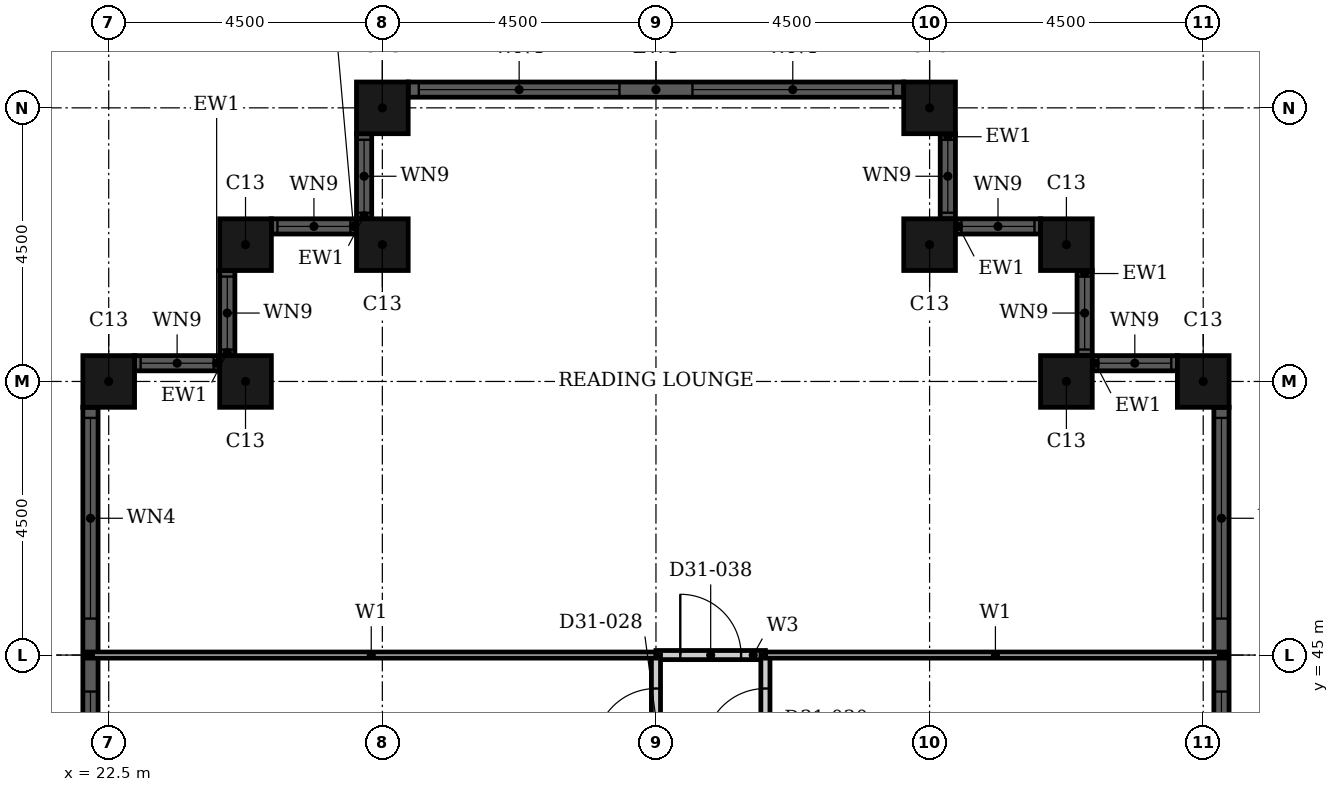
"""IFC4 building model, lengths in metres.
Left out: names, types, materials, properties, quantities, classifications, styles, units other than length and angle.
Written with IfcOpenShell. Run it as: python <this file> out.ifc"""

import sys

from ifc_helpers import new_model, si_unit, direction, frame, frame_2d, origin, origin_2d, place, context, subcontext, project, spatial, rectangle, hollow_rectangle, extrude, element, fill, save


model = new_model("IFC4")
c1 = context("Model", 3, precision=1e-05, world=origin(), true_north=direction((0.0, 1.0)))
c2 = subcontext(c1, "Body", "Model", "MODEL_VIEW")
j1 = project(units=[si_unit("LENGTHUNIT", "METRE"), si_unit("PLANEANGLEUNIT", "RADIAN")], contexts=[c1])
p1 = place(None, origin())
s1 = spatial("IfcSite", under=j1, at=p1, CompositionType="ELEMENT")
p2 = place(p1, origin())
s2 = spatial("IfcBuilding", under=s1, at=p2, CompositionType="ELEMENT")
p3 = place(p2, frame((0.0, 0.0, 126.0)))
s3 = spatial("IfcBuildingStorey", under=s2, at=p3, CompositionType="ELEMENT", Elevation=126.0)
for number, where, z_axis, x_axis in (
    (1, (40.5, 49.5, 0.0), (0.0, 0.0, 1.0), (1.0, 0.0, 0.0)),
    (2, (38.25, 49.5, 0.0), (0.0, 0.0, 1.0), (1.0, 0.0, 0.0)),
    (3, (38.25, 51.75, 0.0), (0.0, 0.0, 1.0), (1.0, 0.0, 0.0)),
    (4, (36.0, 51.75, 0.0), (0.0, 0.0, 1.0), (1.0, 0.0, 0.0)),
    (5, (36.0, 54.0, 0.0), (0.0, 0.0, 1.0), (1.0, 0.0, 0.0)),
    (6, (27.0, 54.0, 0.0), (0.0, 0.0, 1.0), (1.0, 0.0, 0.0)),
    (7, (27.0, 51.75, 0.0), (0.0, 0.0, 1.0), (1.0, 0.0, 0.0)),
    (8, (24.75, 51.75, 0.0), (0.0, 0.0, 1.0), (1.0, 0.0, 0.0)),
    (9, (24.75, 49.5, 0.0), (0.0, 0.0, 1.0), (1.0, 0.0, 0.0)),
    (10, (22.5, 49.5, 0.0), (0.0, 0.0, 1.0), (1.0, 0.0, 0.0)),
):
    element("IfcColumn", number, at=place(p3, frame(where, z_axis=z_axis, x_axis=x_axis)), inside=s3, PredefinedType="COLUMN", context=c2, shape_type="SweptSolid", body=[
        extrude(hollow_rectangle(XDim=0.85, YDim=0.85, WallThickness=0.026, at=origin_2d()), origin(), (0.0, 0.0, 1.0), 3.6),
    ])
p4 = place(p3, frame((40.8, 40.925, 0.0), z_axis=(0.0, 0.0, 1.0), x_axis=(0.0, 1.0, 0.0)))
e11 = element("IfcWall", 11, at=p4, inside=s3, PredefinedType="SOLIDWALL", context=c2, shape_type="SweptSolid", body=[
    extrude(rectangle(XDim=8.15, YDim=0.25, at=frame_2d((4.075, 0.0))), origin(), (0.0, 0.0, 1.0), 3.6),
])
p5 = place(p4, frame((0.175, 0.0, 0.9)))
e12 = element("IfcOpeningElement", 12, at=p5, cuts=e11, PredefinedType="OPENING", context=c2, shape_type="SweptSolid", body=[
    extrude(rectangle(XDim=3.3, YDim=2.08, at=frame_2d((1.65, 1.04))), frame((0.0, 0.135, 0.0), z_axis=(0.0, -1.0, 0.0), x_axis=(1.0, 0.0, 0.0)), (0.0, 0.0, 1.0), 0.27),
])
p6 = place(p4, frame((4.675, 0.0, 0.9)))
e13 = element("IfcOpeningElement", 13, at=p6, cuts=e11, PredefinedType="OPENING", context=c2, shape_type="SweptSolid", body=[
    extrude(rectangle(XDim=3.3, YDim=2.08, at=frame_2d((1.65, 1.04))), frame((0.0, 0.135, 0.0), z_axis=(0.0, -1.0, 0.0), x_axis=(1.0, 0.0, 0.0)), (0.0, 0.0, 1.0), 0.27),
])
p7 = place(p3, frame((40.075, 49.8, 0.0), z_axis=(0.0, 0.0, 1.0), x_axis=(-1.0, 0.0, 0.0)))
e14 = element("IfcWall", 14, at=p7, inside=s3, PredefinedType="SOLIDWALL", context=c2, shape_type="SweptSolid", body=[
    extrude(rectangle(XDim=1.4, YDim=0.25, at=frame_2d((0.7, 0.0))), origin(), (0.0, 0.0, 1.0), 3.6),
])
p8 = place(p7, frame((0.1, 0.0, 0.9)))
e15 = element("IfcOpeningElement", 15, at=p8, cuts=e14, PredefinedType="OPENING", context=c2, shape_type="SweptSolid", body=[
    extrude(rectangle(XDim=1.2, YDim=2.08, at=frame_2d((0.6, 1.04))), frame((0.0, 0.135, 0.0), z_axis=(0.0, -1.0, 0.0), x_axis=(1.0, 0.0, 0.0)), (0.0, 0.0, 1.0), 0.27),
])
p9 = place(p3, frame((38.55, 49.925, 0.0), z_axis=(0.0, 0.0, 1.0), x_axis=(0.0, 1.0, 0.0)))
e16 = element("IfcWall", 16, at=p9, inside=s3, PredefinedType="SOLIDWALL", context=c2, shape_type="SweptSolid", body=[
    extrude(rectangle(XDim=1.4, YDim=0.25, at=frame_2d((0.7, 0.0))), origin(), (0.0, 0.0, 1.0), 3.6),
])
p10 = place(p9, frame((0.1, 0.0, 0.9)))
e17 = element("IfcOpeningElement", 17, at=p10, cuts=e16, PredefinedType="OPENING", context=c2, shape_type="SweptSolid", body=[
    extrude(rectangle(XDim=1.2, YDim=2.08, at=frame_2d((0.6, 1.04))), frame((0.0, 0.135, 0.0), z_axis=(0.0, -1.0, 0.0), x_axis=(1.0, 0.0, 0.0)), (0.0, 0.0, 1.0), 0.27),
])
p11 = place(p3, frame((37.825, 52.05, 0.0), z_axis=(0.0, 0.0, 1.0), x_axis=(-1.0, 0.0, 0.0)))
e18 = element("IfcWall", 18, at=p11, inside=s3, PredefinedType="SOLIDWALL", context=c2, shape_type="SweptSolid", body=[
    extrude(rectangle(XDim=1.4, YDim=0.25, at=frame_2d((0.7, 0.0))), origin(), (0.0, 0.0, 1.0), 3.6),
])
p12 = place(p11, frame((0.1, 0.0, 0.9)))
e19 = element("IfcOpeningElement", 19, at=p12, cuts=e18, PredefinedType="OPENING", context=c2, shape_type="SweptSolid", body=[
    extrude(rectangle(XDim=1.2, YDim=2.08, at=frame_2d((0.6, 1.04))), frame((0.0, 0.135, 0.0), z_axis=(0.0, -1.0, 0.0), x_axis=(1.0, 0.0, 0.0)), (0.0, 0.0, 1.0), 0.27),
])
p13 = place(p3, frame((36.3, 52.175, 0.0), z_axis=(0.0, 0.0, 1.0), x_axis=(0.0, 1.0, 0.0)))
e20 = element("IfcWall", 20, at=p13, inside=s3, PredefinedType="SOLIDWALL", context=c2, shape_type="SweptSolid", body=[
    extrude(rectangle(XDim=1.4, YDim=0.25, at=frame_2d((0.7, 0.0))), origin(), (0.0, 0.0, 1.0), 3.6),
])
p14 = place(p13, frame((0.1, 0.0, 0.9)))
e21 = element("IfcOpeningElement", 21, at=p14, cuts=e20, PredefinedType="OPENING", context=c2, shape_type="SweptSolid", body=[
    extrude(rectangle(XDim=1.2, YDim=2.08, at=frame_2d((0.6, 1.04))), frame((0.0, 0.135, 0.0), z_axis=(0.0, -1.0, 0.0), x_axis=(1.0, 0.0, 0.0)), (0.0, 0.0, 1.0), 0.27),
])
p15 = place(p3, frame((35.575, 54.3, 0.0), z_axis=(0.0, 0.0, 1.0), x_axis=(-1.0, 0.0, 0.0)))
e22 = element("IfcWall", 22, at=p15, inside=s3, PredefinedType="SOLIDWALL", context=c2, shape_type="SweptSolid", body=[
    extrude(rectangle(XDim=8.15, YDim=0.25, at=frame_2d((4.075, 0.0))), origin(), (0.0, 0.0, 1.0), 3.6),
])
p16 = place(p15, frame((0.175, 0.0, 0.9)))
e23 = element("IfcOpeningElement", 23, at=p16, cuts=e22, PredefinedType="OPENING", context=c2, shape_type="SweptSolid", body=[
    extrude(rectangle(XDim=3.3, YDim=2.08, at=frame_2d((1.65, 1.04))), frame((0.0, 0.135, 0.0), z_axis=(0.0, -1.0, 0.0), x_axis=(1.0, 0.0, 0.0)), (0.0, 0.0, 1.0), 0.27),
])
p17 = place(p15, frame((4.675, 0.0, 0.9)))
e24 = element("IfcOpeningElement", 24, at=p17, cuts=e22, PredefinedType="OPENING", context=c2, shape_type="SweptSolid", body=[
    extrude(rectangle(XDim=3.3, YDim=2.08, at=frame_2d((1.65, 1.04))), frame((0.0, 0.135, 0.0), z_axis=(0.0, -1.0, 0.0), x_axis=(1.0, 0.0, 0.0)), (0.0, 0.0, 1.0), 0.27),
])
p18 = place(p3, frame((26.7, 53.575, 0.0), z_axis=(0.0, 0.0, 1.0), x_axis=(0.0, -1.0, 0.0)))
e25 = element("IfcWall", 25, at=p18, inside=s3, PredefinedType="SOLIDWALL", context=c2, shape_type="SweptSolid", body=[
    extrude(rectangle(XDim=1.4, YDim=0.25, at=frame_2d((0.7, 0.0))), origin(), (0.0, 0.0, 1.0), 3.6),
])
p19 = place(p18, frame((0.1, 0.0, 0.9)))
e26 = element("IfcOpeningElement", 26, at=p19, cuts=e25, PredefinedType="OPENING", context=c2, shape_type="SweptSolid", body=[
    extrude(rectangle(XDim=1.2, YDim=2.08, at=frame_2d((0.6, 1.04))), frame((0.0, 0.135, 0.0), z_axis=(0.0, -1.0, 0.0), x_axis=(1.0, 0.0, 0.0)), (0.0, 0.0, 1.0), 0.27),
])
p20 = place(p3, frame((26.575, 52.05, 0.0), z_axis=(0.0, 0.0, 1.0), x_axis=(-1.0, 0.0, 0.0)))
e27 = element("IfcWall", 27, at=p20, inside=s3, PredefinedType="SOLIDWALL", context=c2, shape_type="SweptSolid", body=[
    extrude(rectangle(XDim=1.4, YDim=0.25, at=frame_2d((0.7, 0.0))), origin(), (0.0, 0.0, 1.0), 3.6),
])
p21 = place(p20, frame((0.1, 0.0, 0.9)))
e28 = element("IfcOpeningElement", 28, at=p21, cuts=e27, PredefinedType="OPENING", context=c2, shape_type="SweptSolid", body=[
    extrude(rectangle(XDim=1.2, YDim=2.08, at=frame_2d((0.6, 1.04))), frame((0.0, 0.135, 0.0), z_axis=(0.0, -1.0, 0.0), x_axis=(1.0, 0.0, 0.0)), (0.0, 0.0, 1.0), 0.27),
])
p22 = place(p3, frame((24.45, 51.325, 0.0), z_axis=(0.0, 0.0, 1.0), x_axis=(0.0, -1.0, 0.0)))
e29 = element("IfcWall", 29, at=p22, inside=s3, PredefinedType="SOLIDWALL", context=c2, shape_type="SweptSolid", body=[
    extrude(rectangle(XDim=1.4, YDim=0.25, at=frame_2d((0.7, 0.0))), origin(), (0.0, 0.0, 1.0), 3.6),
])
p23 = place(p22, frame((0.1, 0.0, 0.9)))
e30 = element("IfcOpeningElement", 30, at=p23, cuts=e29, PredefinedType="OPENING", context=c2, shape_type="SweptSolid", body=[
    extrude(rectangle(XDim=1.2, YDim=2.08, at=frame_2d((0.6, 1.04))), frame((0.0, 0.135, 0.0), z_axis=(0.0, -1.0, 0.0), x_axis=(1.0, 0.0, 0.0)), (0.0, 0.0, 1.0), 0.27),
])
p24 = place(p3, frame((24.325, 49.8, 0.0), z_axis=(0.0, 0.0, 1.0), x_axis=(-1.0, 0.0, 0.0)))
e31 = element("IfcWall", 31, at=p24, inside=s3, PredefinedType="SOLIDWALL", context=c2, shape_type="SweptSolid", body=[
    extrude(rectangle(XDim=1.4, YDim=0.25, at=frame_2d((0.7, 0.0))), origin(), (0.0, 0.0, 1.0), 3.6),
])
p25 = place(p24, frame((0.1, 0.0, 0.9)))
e32 = element("IfcOpeningElement", 32, at=p25, cuts=e31, PredefinedType="OPENING", context=c2, shape_type="SweptSolid", body=[
    extrude(rectangle(XDim=1.2, YDim=2.08, at=frame_2d((0.6, 1.04))), frame((0.0, 0.135, 0.0), z_axis=(0.0, -1.0, 0.0), x_axis=(1.0, 0.0, 0.0)), (0.0, 0.0, 1.0), 0.27),
])
p26 = place(p3, frame((22.2, 49.075, 0.0), z_axis=(0.0, 0.0, 1.0), x_axis=(0.0, -1.0, 0.0)))
e33 = element("IfcWall", 33, at=p26, inside=s3, PredefinedType="SOLIDWALL", context=c2, shape_type="SweptSolid", body=[
    extrude(rectangle(XDim=8.15, YDim=0.25, at=frame_2d((4.075, 0.0))), origin(), (0.0, 0.0, 1.0), 3.6),
])
p27 = place(p26, frame((0.175, 0.0, 0.9)))
e34 = element("IfcOpeningElement", 34, at=p27, cuts=e33, PredefinedType="OPENING", context=c2, shape_type="SweptSolid", body=[
    extrude(rectangle(XDim=3.3, YDim=2.08, at=frame_2d((1.65, 1.04))), frame((0.0, 0.135, 0.0), z_axis=(0.0, -1.0, 0.0), x_axis=(1.0, 0.0, 0.0)), (0.0, 0.0, 1.0), 0.27),
])
p28 = place(p26, frame((4.675, 0.0, 0.9)))
e35 = element("IfcOpeningElement", 35, at=p28, cuts=e33, PredefinedType="OPENING", context=c2, shape_type="SweptSolid", body=[
    extrude(rectangle(XDim=3.3, YDim=2.08, at=frame_2d((1.65, 1.04))), frame((0.0, 0.135, 0.0), z_axis=(0.0, -1.0, 0.0), x_axis=(1.0, 0.0, 0.0)), (0.0, 0.0, 1.0), 0.27),
])
p29 = place(p3, frame((31.5, 45.0, 0.0), z_axis=(0.0, 0.0, 1.0), x_axis=(1.0, 0.0, 0.0)))
e36 = element("IfcWall", 36, at=p29, inside=s3, PredefinedType="PARTITIONING", context=c2, shape_type="SweptSolid", body=[
    extrude(rectangle(XDim=1.8, YDim=0.15, at=frame_2d((0.9, 0.0))), origin(), (0.0, 0.0, 1.0), 3.3),
])
p30 = place(p29, frame((0.4, 0.0, 0.0)))
e37 = element("IfcOpeningElement", 37, at=p30, cuts=e36, PredefinedType="OPENING", context=c2, shape_type="SweptSolid", body=[
    extrude(rectangle(XDim=1.0, YDim=2.1, at=frame_2d((0.5, 1.05))), frame((0.0, 0.085, 0.0), z_axis=(0.0, -1.0, 0.0), x_axis=(1.0, 0.0, 0.0)), (0.0, 0.0, 1.0), 0.17),
])
p31 = place(p3, frame((31.5, 33.3, 0.0), z_axis=(0.0, 0.0, 1.0), x_axis=(0.0, 1.0, 0.0)))
e38 = element("IfcWall", 38, at=p31, inside=s3, PredefinedType="PARTITIONING", context=c2, shape_type="SweptSolid", body=[
    extrude(rectangle(XDim=11.7, YDim=0.15, at=frame_2d((5.85, 0.0))), origin(), (0.0, 0.0, 1.0), 2.58),
])
p32 = place(p31, frame((10.15, 0.0, 0.0)))
e39 = element("IfcOpeningElement", 39, at=p32, cuts=e38, PredefinedType="OPENING", context=c2, shape_type="SweptSolid", body=[
    extrude(rectangle(XDim=1.0, YDim=2.1, at=frame_2d((0.5, 1.05))), frame((0.0, 0.085, 0.0), z_axis=(0.0, -1.0, 0.0), x_axis=(1.0, 0.0, 0.0)), (0.0, 0.0, 1.0), 0.17),
])
p33 = place(p3, frame((33.3, 33.3, 0.0), z_axis=(0.0, 0.0, 1.0), x_axis=(0.0, 1.0, 0.0)))
e40 = element("IfcWall", 40, at=p33, inside=s3, PredefinedType="PARTITIONING", context=c2, shape_type="SweptSolid", body=[
    extrude(rectangle(XDim=11.7, YDim=0.15, at=frame_2d((5.85, 0.0))), origin(), (0.0, 0.0, 1.0), 3.3),
])
p34 = place(p33, frame((10.15, 0.0, 0.0)))
e41 = element("IfcOpeningElement", 41, at=p34, cuts=e40, PredefinedType="OPENING", context=c2, shape_type="SweptSolid", body=[
    extrude(rectangle(XDim=1.0, YDim=2.1, at=frame_2d((0.5, 1.05))), frame((0.0, 0.085, 0.0), z_axis=(0.0, -1.0, 0.0), x_axis=(1.0, 0.0, 0.0)), (0.0, 0.0, 1.0), 0.17),
])
p35 = place(p3, frame((33.3, 45.0, 0.0), z_axis=(0.0, 0.0, 1.0), x_axis=(1.0, 0.0, 0.0)))
e42 = element("IfcWall", 42, at=p35, inside=s3, PredefinedType="PARTITIONING", context=c2, shape_type="SweptSolid", body=[
    extrude(rectangle(XDim=7.565, YDim=0.1, at=frame_2d((3.782, 0.0))), origin(), (0.0, 0.0, 1.0), 3.3),
])
p36 = place(p3, frame((22.135, 45.0, 0.0), z_axis=(0.0, 0.0, 1.0), x_axis=(1.0, 0.0, 0.0)))
e43 = element("IfcWall", 43, at=p36, inside=s3, PredefinedType="PARTITIONING", context=c2, shape_type="SweptSolid", body=[
    extrude(rectangle(XDim=9.365, YDim=0.1, at=frame_2d((4.683, 0.0))), origin(), (0.0, 0.0, 1.0), 3.3),
])
p37 = place(p5, origin())
e44 = element("IfcWindow", 44, at=p37, inside=s3, PartitioningType="SINGLE_PANEL", PredefinedType="WINDOW", context=c2, shape_type="SweptSolid", body=[
    extrude(rectangle(XDim=3.3, YDim=2.08, at=frame_2d((1.65, 1.04))), frame((0.0, 0.03, 0.0), z_axis=(0.0, -1.0, 0.0), x_axis=(1.0, 0.0, 0.0)), (0.0, 0.0, 1.0), 0.06),
])
fill(e12, e44)
p38 = place(p6, origin())
e45 = element("IfcWindow", 45, at=p38, inside=s3, PartitioningType="SINGLE_PANEL", PredefinedType="WINDOW", context=c2, shape_type="SweptSolid", body=[
    extrude(rectangle(XDim=3.3, YDim=2.08, at=frame_2d((1.65, 1.04))), frame((0.0, 0.03, 0.0), z_axis=(0.0, -1.0, 0.0), x_axis=(1.0, 0.0, 0.0)), (0.0, 0.0, 1.0), 0.06),
])
fill(e13, e45)
p39 = place(p8, origin())
e46 = element("IfcWindow", 46, at=p39, inside=s3, PartitioningType="SINGLE_PANEL", PredefinedType="WINDOW", context=c2, shape_type="SweptSolid", body=[
    extrude(rectangle(XDim=1.2, YDim=2.08, at=frame_2d((0.6, 1.04))), frame((0.0, 0.03, 0.0), z_axis=(0.0, -1.0, 0.0), x_axis=(1.0, 0.0, 0.0)), (0.0, 0.0, 1.0), 0.06),
])
fill(e15, e46)
p40 = place(p10, origin())
e47 = element("IfcWindow", 47, at=p40, inside=s3, PartitioningType="SINGLE_PANEL", PredefinedType="WINDOW", context=c2, shape_type="SweptSolid", body=[
    extrude(rectangle(XDim=1.2, YDim=2.08, at=frame_2d((0.6, 1.04))), frame((0.0, 0.03, 0.0), z_axis=(0.0, -1.0, 0.0), x_axis=(1.0, 0.0, 0.0)), (0.0, 0.0, 1.0), 0.06),
])
fill(e17, e47)
p41 = place(p12, origin())
e48 = element("IfcWindow", 48, at=p41, inside=s3, PartitioningType="SINGLE_PANEL", PredefinedType="WINDOW", context=c2, shape_type="SweptSolid", body=[
    extrude(rectangle(XDim=1.2, YDim=2.08, at=frame_2d((0.6, 1.04))), frame((0.0, 0.03, 0.0), z_axis=(0.0, -1.0, 0.0), x_axis=(1.0, 0.0, 0.0)), (0.0, 0.0, 1.0), 0.06),
])
fill(e19, e48)
p42 = place(p14, origin())
e49 = element("IfcWindow", 49, at=p42, inside=s3, PartitioningType="SINGLE_PANEL", PredefinedType="WINDOW", context=c2, shape_type="SweptSolid", body=[
    extrude(rectangle(XDim=1.2, YDim=2.08, at=frame_2d((0.6, 1.04))), frame((0.0, 0.03, 0.0), z_axis=(0.0, -1.0, 0.0), x_axis=(1.0, 0.0, 0.0)), (0.0, 0.0, 1.0), 0.06),
])
fill(e21, e49)
p43 = place(p16, origin())
e50 = element("IfcWindow", 50, at=p43, inside=s3, PartitioningType="SINGLE_PANEL", PredefinedType="WINDOW", context=c2, shape_type="SweptSolid", body=[
    extrude(rectangle(XDim=3.3, YDim=2.08, at=frame_2d((1.65, 1.04))), frame((0.0, 0.03, 0.0), z_axis=(0.0, -1.0, 0.0), x_axis=(1.0, 0.0, 0.0)), (0.0, 0.0, 1.0), 0.06),
])
fill(e23, e50)
p44 = place(p17, origin())
e51 = element("IfcWindow", 51, at=p44, inside=s3, PartitioningType="SINGLE_PANEL", PredefinedType="WINDOW", context=c2, shape_type="SweptSolid", body=[
    extrude(rectangle(XDim=3.3, YDim=2.08, at=frame_2d((1.65, 1.04))), frame((0.0, 0.03, 0.0), z_axis=(0.0, -1.0, 0.0), x_axis=(1.0, 0.0, 0.0)), (0.0, 0.0, 1.0), 0.06),
])
fill(e24, e51)
p45 = place(p19, origin())
e52 = element("IfcWindow", 52, at=p45, inside=s3, PartitioningType="SINGLE_PANEL", PredefinedType="WINDOW", context=c2, shape_type="SweptSolid", body=[
    extrude(rectangle(XDim=1.2, YDim=2.08, at=frame_2d((0.6, 1.04))), frame((0.0, 0.03, 0.0), z_axis=(0.0, -1.0, 0.0), x_axis=(1.0, 0.0, 0.0)), (0.0, 0.0, 1.0), 0.06),
])
fill(e26, e52)
p46 = place(p21, origin())
e53 = element("IfcWindow", 53, at=p46, inside=s3, PartitioningType="SINGLE_PANEL", PredefinedType="WINDOW", context=c2, shape_type="SweptSolid", body=[
    extrude(rectangle(XDim=1.2, YDim=2.08, at=frame_2d((0.6, 1.04))), frame((0.0, 0.03, 0.0), z_axis=(0.0, -1.0, 0.0), x_axis=(1.0, 0.0, 0.0)), (0.0, 0.0, 1.0), 0.06),
])
fill(e28, e53)
p47 = place(p23, origin())
e54 = element("IfcWindow", 54, at=p47, inside=s3, PartitioningType="SINGLE_PANEL", PredefinedType="WINDOW", context=c2, shape_type="SweptSolid", body=[
    extrude(rectangle(XDim=1.2, YDim=2.08, at=frame_2d((0.6, 1.04))), frame((0.0, 0.03, 0.0), z_axis=(0.0, -1.0, 0.0), x_axis=(1.0, 0.0, 0.0)), (0.0, 0.0, 1.0), 0.06),
])
fill(e30, e54)
p48 = place(p25, origin())
e55 = element("IfcWindow", 55, at=p48, inside=s3, PartitioningType="SINGLE_PANEL", PredefinedType="WINDOW", context=c2, shape_type="SweptSolid", body=[
    extrude(rectangle(XDim=1.2, YDim=2.08, at=frame_2d((0.6, 1.04))), frame((0.0, 0.03, 0.0), z_axis=(0.0, -1.0, 0.0), x_axis=(1.0, 0.0, 0.0)), (0.0, 0.0, 1.0), 0.06),
])
fill(e32, e55)
p49 = place(p27, origin())
e56 = element("IfcWindow", 56, at=p49, inside=s3, PartitioningType="SINGLE_PANEL", PredefinedType="WINDOW", context=c2, shape_type="SweptSolid", body=[
    extrude(rectangle(XDim=3.3, YDim=2.08, at=frame_2d((1.65, 1.04))), frame((0.0, 0.03, 0.0), z_axis=(0.0, -1.0, 0.0), x_axis=(1.0, 0.0, 0.0)), (0.0, 0.0, 1.0), 0.06),
])
fill(e34, e56)
p50 = place(p28, origin())
e57 = element("IfcWindow", 57, at=p50, inside=s3, PartitioningType="SINGLE_PANEL", PredefinedType="WINDOW", context=c2, shape_type="SweptSolid", body=[
    extrude(rectangle(XDim=3.3, YDim=2.08, at=frame_2d((1.65, 1.04))), frame((0.0, 0.03, 0.0), z_axis=(0.0, -1.0, 0.0), x_axis=(1.0, 0.0, 0.0)), (0.0, 0.0, 1.0), 0.06),
])
fill(e35, e57)
p51 = place(p32, origin())
e58 = element("IfcDoor", 58, at=p51, inside=s3, OperationType="SINGLE_SWING_RIGHT", PredefinedType="DOOR", context=c2, shape_type="SweptSolid", body=[
    extrude(rectangle(XDim=1.0, YDim=2.1, at=frame_2d((0.5, 1.05))), frame((0.0, 0.025, 0.0), z_axis=(0.0, -1.0, 0.0), x_axis=(1.0, 0.0, 0.0)), (0.0, 0.0, 1.0), 0.05),
])
fill(e39, e58)
p52 = place(p34, origin())
e59 = element("IfcDoor", 59, at=p52, inside=s3, OperationType="SINGLE_SWING_RIGHT", PredefinedType="DOOR", context=c2, shape_type="SweptSolid", body=[
    extrude(rectangle(XDim=1.0, YDim=2.1, at=frame_2d((0.5, 1.05))), frame((0.0, 0.025, 0.0), z_axis=(0.0, -1.0, 0.0), x_axis=(1.0, 0.0, 0.0)), (0.0, 0.0, 1.0), 0.05),
])
fill(e41, e59)
p53 = place(p30, origin())
e60 = element("IfcDoor", 60, at=p53, inside=s3, OperationType="SINGLE_SWING_RIGHT", PredefinedType="DOOR", context=c2, shape_type="SweptSolid", body=[
    extrude(rectangle(XDim=1.0, YDim=2.1, at=frame_2d((0.5, 1.05))), frame((0.0, 0.025, 0.0), z_axis=(0.0, -1.0, 0.0), x_axis=(1.0, 0.0, 0.0)), (0.0, 0.0, 1.0), 0.05),
])
fill(e37, e60)
save(model, sys.argv[1])
